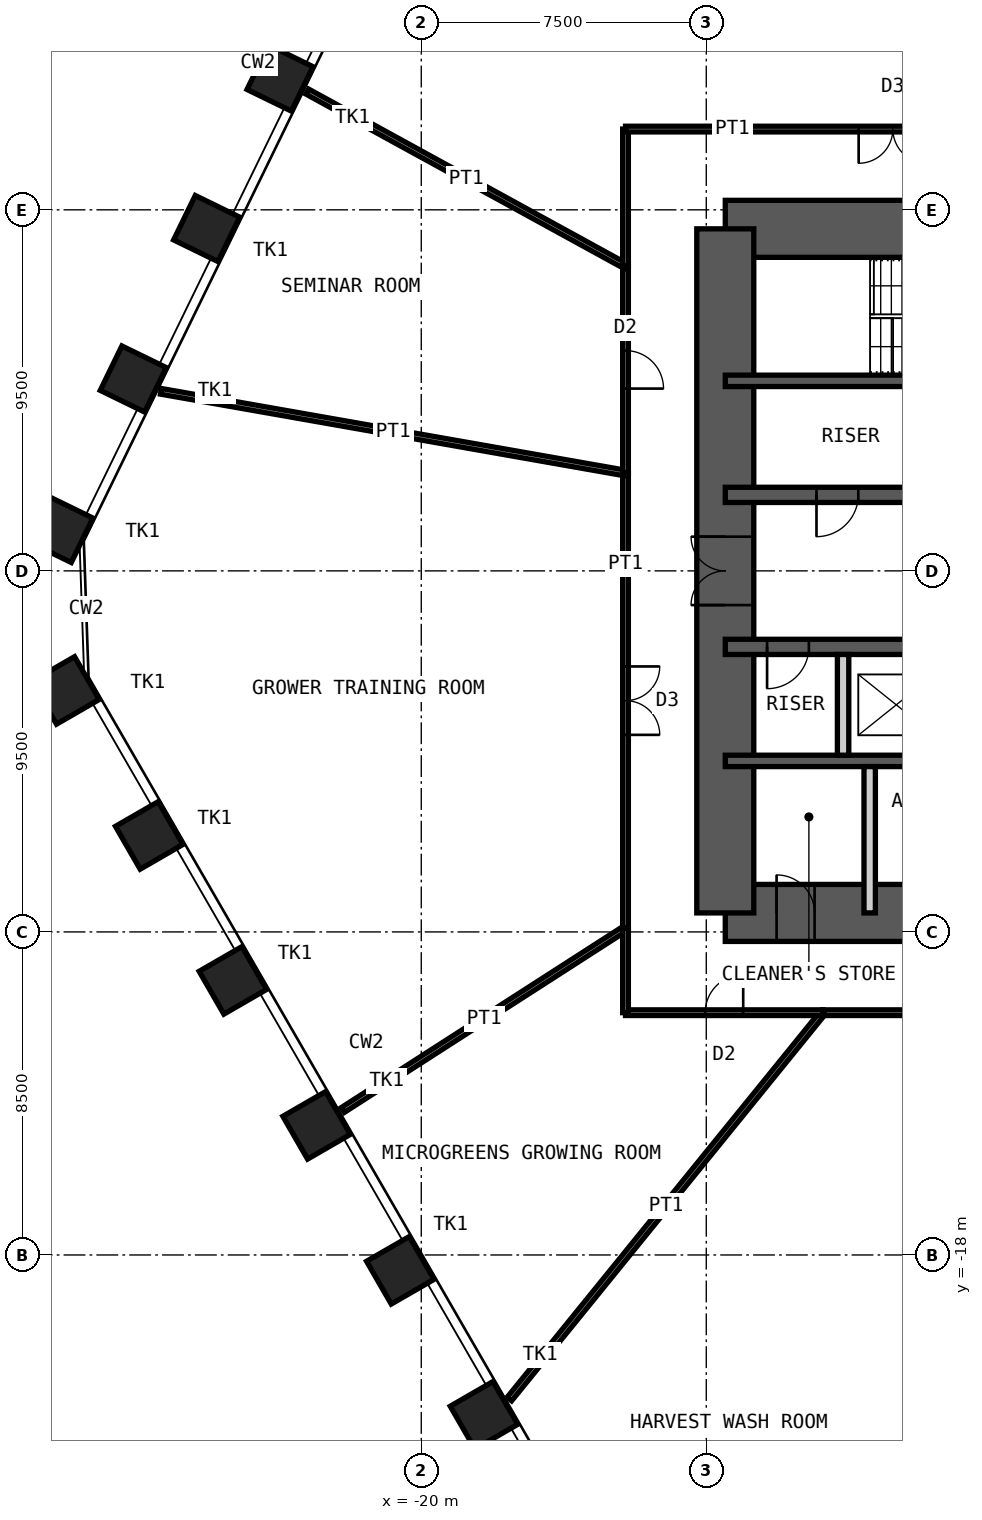
"""IFC4 building model, lengths in metres.
Left out: names, types, materials, properties, quantities, classifications, styles, units other than length and angle.
Written with IfcOpenShell. Run it as: python <this file> out.ifc"""

import sys

from ifc_helpers import new_model, si_unit, direction, frame, frame_2d, origin, origin_2d, place, context, subcontext, project, spatial, rectangle, hollow_rectangle, extrude, element, fill, save


model = new_model("IFC4")
c1 = context("Model", 3, precision=1e-05, world=origin(), true_north=direction((0.0, 1.0)))
c2 = subcontext(c1, "Body", "Model", "MODEL_VIEW")
j1 = project(units=[si_unit("LENGTHUNIT", "METRE"), si_unit("PLANEANGLEUNIT", "RADIAN")], contexts=[c1])
p1 = place(None, origin())
s1 = spatial("IfcSite", under=j1, at=p1, CompositionType="ELEMENT")
p2 = place(p1, origin())
s2 = spatial("IfcBuilding", under=s1, at=p2, CompositionType="ELEMENT")
p3 = place(p2, frame((0.0, 0.0, 92.0)))
s3 = spatial("IfcBuildingStorey", under=s2, at=p3, CompositionType="ELEMENT", Elevation=92.0)
for number, where, z_axis, x_axis in (
    (1, (-18.349, -22.218, 0.0), (0.0, 0.0, 1.0), (0.5, -0.866, 0.0)),
    (2, (-20.552, -18.404, 0.0), (0.0, 0.0, 1.0), (0.5, -0.866, 0.0)),
    (3, (-22.754, -14.589, 0.0), (0.0, 0.0, 1.0), (0.5, -0.866, 0.0)),
    (4, (-24.956, -10.775, 0.0), (0.0, 0.0, 1.0), (0.5, -0.866, 0.0)),
    (5, (-27.158, -6.96, 0.0), (0.0, 0.0, 1.0), (0.5, -0.866, 0.0)),
    (6, (-29.361, -3.146, 0.0), (0.0, 0.0, 1.0), (0.5, -0.866, 0.0)),
    (7, (-29.509, 1.09, 0.0), (0.0, 0.0, 1.0), (-0.438, -0.899, 0.0)),
    (8, (-27.578, 5.049, 0.0), (0.0, 0.0, 1.0), (-0.438, -0.899, 0.0)),
    (9, (-25.647, 9.008, 0.0), (0.0, 0.0, 1.0), (-0.438, -0.899, 0.0)),
    (10, (-23.716, 12.966, 0.0), (0.0, 0.0, 1.0), (-0.438, -0.899, 0.0)),
):
    element("IfcColumn", number, at=place(p3, frame(where, z_axis=z_axis, x_axis=x_axis)), inside=s3, PredefinedType="COLUMN", context=c2, shape_type="SweptSolid", body=[
        extrude(hollow_rectangle(XDim=1.3, YDim=1.3, WallThickness=0.1, at=origin_2d()), origin(), (0.0, 0.0, 1.0), 5.0),
    ])
p4 = place(p3, frame((-12.0, 9.0, 0.0), z_axis=(0.0, 0.0, 1.0), x_axis=(1.0, 0.0, 0.0)))
e11 = element("IfcWall", 11, at=p4, inside=s3, PredefinedType="SHEAR", context=c2, shape_type="SweptSolid", body=[
    extrude(rectangle(XDim=24.0, YDim=1.5, at=frame_2d((12.0, 0.0))), origin(), (0.0, 0.0, 1.0), 5.0),
])
p5 = place(p4, frame((10.4, 0.0, 0.0)))
e12 = element("IfcOpeningElement", 12, at=p5, cuts=e11, PredefinedType="OPENING", context=c2, shape_type="SweptSolid", body=[
    extrude(rectangle(XDim=1.0, YDim=2.1, at=frame_2d((0.5, 1.05))), frame((0.0, 0.76, 0.0), z_axis=(0.0, -1.0, 0.0), x_axis=(1.0, 0.0, 0.0)), (0.0, 0.0, 1.0), 1.52),
])
p6 = place(p4, frame((17.6, 0.0, 0.0)))
e13 = element("IfcOpeningElement", 13, at=p6, cuts=e11, PredefinedType="OPENING", context=c2, shape_type="SweptSolid", body=[
    extrude(rectangle(XDim=0.9, YDim=2.1, at=frame_2d((0.45, 1.05))), frame((0.0, 0.76, 0.0), z_axis=(0.0, -1.0, 0.0), x_axis=(1.0, 0.0, 0.0)), (0.0, 0.0, 1.0), 1.52),
])
p7 = place(p4, frame((21.9, 0.0, 0.0)))
e14 = element("IfcOpeningElement", 14, at=p7, cuts=e11, PredefinedType="OPENING", context=c2, shape_type="SweptSolid", body=[
    extrude(rectangle(XDim=0.9, YDim=2.1, at=frame_2d((0.45, 1.05))), frame((0.0, 0.76, 0.0), z_axis=(0.0, -1.0, 0.0), x_axis=(1.0, 0.0, 0.0)), (0.0, 0.0, 1.0), 1.52),
])
p8 = place(p3, frame((-12.0, -9.0, 0.0), z_axis=(0.0, 0.0, 1.0), x_axis=(1.0, 0.0, 0.0)))
e15 = element("IfcWall", 15, at=p8, inside=s3, PredefinedType="SHEAR", context=c2, shape_type="SweptSolid", body=[
    extrude(rectangle(XDim=24.0, YDim=1.5, at=frame_2d((12.0, 0.0))), origin(), (0.0, 0.0, 1.0), 5.0),
])
p9 = place(p8, frame((1.35, 0.0, 0.0)))
e16 = element("IfcOpeningElement", 16, at=p9, cuts=e15, PredefinedType="OPENING", context=c2, shape_type="SweptSolid", body=[
    extrude(rectangle(XDim=1.0, YDim=2.1, at=frame_2d((0.5, 1.05))), frame((0.0, 0.76, 0.0), z_axis=(0.0, -1.0, 0.0), x_axis=(1.0, 0.0, 0.0)), (0.0, 0.0, 1.0), 1.52),
])
p10 = place(p8, frame((5.325, 0.0, 0.0)))
e17 = element("IfcOpeningElement", 17, at=p10, cuts=e15, PredefinedType="OPENING", context=c2, shape_type="SweptSolid", body=[
    extrude(rectangle(XDim=1.15, YDim=2.1, at=frame_2d((0.575, 1.05))), frame((0.0, 0.76, 0.0), z_axis=(0.0, -1.0, 0.0), x_axis=(1.0, 0.0, 0.0)), (0.0, 0.0, 1.0), 1.52),
])
p11 = place(p8, frame((12.6, 0.0, 0.0)))
e18 = element("IfcOpeningElement", 18, at=p11, cuts=e15, PredefinedType="OPENING", context=c2, shape_type="SweptSolid", body=[
    extrude(rectangle(XDim=1.0, YDim=2.1, at=frame_2d((0.5, 1.05))), frame((0.0, 0.76, 0.0), z_axis=(0.0, -1.0, 0.0), x_axis=(1.0, 0.0, 0.0)), (0.0, 0.0, 1.0), 1.52),
])
p12 = place(p3, frame((-12.0, -9.0, 0.0), z_axis=(0.0, 0.0, 1.0), x_axis=(0.0, 1.0, 0.0)))
e19 = element("IfcWall", 19, at=p12, inside=s3, PredefinedType="SHEAR", context=c2, shape_type="SweptSolid", body=[
    extrude(rectangle(XDim=18.0, YDim=1.5, at=frame_2d((9.0, 0.0))), origin(), (0.0, 0.0, 1.0), 5.0),
])
p13 = place(p12, frame((8.1, 0.0, 0.0)))
e20 = element("IfcOpeningElement", 20, at=p13, cuts=e19, PredefinedType="OPENING", context=c2, shape_type="SweptSolid", body=[
    extrude(rectangle(XDim=1.8, YDim=2.1, at=frame_2d((0.9, 1.05))), frame((0.0, 0.76, 0.0), z_axis=(0.0, -1.0, 0.0), x_axis=(1.0, 0.0, 0.0)), (0.0, 0.0, 1.0), 1.52),
])
p14 = place(p3, frame((-12.0, 5.0, 0.0), z_axis=(0.0, 0.0, 1.0), x_axis=(1.0, 0.0, 0.0)))
e21 = element("IfcWall", 21, at=p14, inside=s3, PredefinedType="SHEAR", context=c2, shape_type="SweptSolid", body=[
    extrude(rectangle(XDim=24.0, YDim=0.3, at=frame_2d((12.0, 0.0))), origin(), (0.0, 0.0, 1.0), 5.0),
])
p15 = place(p3, frame((-12.0, 2.0, 0.0), z_axis=(0.0, 0.0, 1.0), x_axis=(1.0, 0.0, 0.0)))
e22 = element("IfcWall", 22, at=p15, inside=s3, PredefinedType="SHEAR", context=c2, shape_type="SweptSolid", body=[
    extrude(rectangle(XDim=24.0, YDim=0.4, at=frame_2d((12.0, 0.0))), origin(), (0.0, 0.0, 1.0), 5.0),
])
p16 = place(p15, frame((2.4, 0.0, 0.0)))
e23 = element("IfcOpeningElement", 23, at=p16, cuts=e22, PredefinedType="OPENING", context=c2, shape_type="SweptSolid", body=[
    extrude(rectangle(XDim=1.1, YDim=2.1, at=frame_2d((0.55, 1.05))), frame((0.0, 0.21, 0.0), z_axis=(0.0, -1.0, 0.0), x_axis=(1.0, 0.0, 0.0)), (0.0, 0.0, 1.0), 0.42),
])
p17 = place(p15, frame((22.0, 0.0, 0.0)))
e24 = element("IfcOpeningElement", 24, at=p17, cuts=e22, PredefinedType="OPENING", context=c2, shape_type="SweptSolid", body=[
    extrude(rectangle(XDim=1.1, YDim=2.1, at=frame_2d((0.55, 1.05))), frame((0.0, 0.21, 0.0), z_axis=(0.0, -1.0, 0.0), x_axis=(1.0, 0.0, 0.0)), (0.0, 0.0, 1.0), 0.42),
])
p18 = place(p15, frame((10.15, 0.0, 0.0)))
e25 = element("IfcOpeningElement", 25, at=p18, cuts=e22, PredefinedType="OPENING", context=c2, shape_type="SweptSolid", body=[
    extrude(rectangle(XDim=1.0, YDim=2.1, at=frame_2d((0.5, 1.05))), frame((0.0, 0.21, 0.0), z_axis=(0.0, -1.0, 0.0), x_axis=(1.0, 0.0, 0.0)), (0.0, 0.0, 1.0), 0.42),
])
p19 = place(p15, frame((6.7, 0.0, 0.0)))
e26 = element("IfcOpeningElement", 26, at=p19, cuts=e22, PredefinedType="OPENING", context=c2, shape_type="SweptSolid", body=[
    extrude(rectangle(XDim=1.4, YDim=2.4, at=frame_2d((0.7, 1.2))), frame((0.0, 0.21, 0.0), z_axis=(0.0, -1.0, 0.0), x_axis=(1.0, 0.0, 0.0)), (0.0, 0.0, 1.0), 0.42),
])
p20 = place(p15, frame((13.35, 0.0, 0.0)))
e27 = element("IfcOpeningElement", 27, at=p20, cuts=e22, PredefinedType="OPENING", context=c2, shape_type="SweptSolid", body=[
    extrude(rectangle(XDim=1.1, YDim=2.4, at=frame_2d((0.55, 1.2))), frame((0.0, 0.21, 0.0), z_axis=(0.0, -1.0, 0.0), x_axis=(1.0, 0.0, 0.0)), (0.0, 0.0, 1.0), 0.42),
])
p21 = place(p15, frame((16.15, 0.0, 0.0)))
e28 = element("IfcOpeningElement", 28, at=p21, cuts=e22, PredefinedType="OPENING", context=c2, shape_type="SweptSolid", body=[
    extrude(rectangle(XDim=1.1, YDim=2.4, at=frame_2d((0.55, 1.2))), frame((0.0, 0.21, 0.0), z_axis=(0.0, -1.0, 0.0), x_axis=(1.0, 0.0, 0.0)), (0.0, 0.0, 1.0), 0.42),
])
p22 = place(p15, frame((18.95, 0.0, 0.0)))
e29 = element("IfcOpeningElement", 29, at=p22, cuts=e22, PredefinedType="OPENING", context=c2, shape_type="SweptSolid", body=[
    extrude(rectangle(XDim=1.1, YDim=2.4, at=frame_2d((0.55, 1.2))), frame((0.0, 0.21, 0.0), z_axis=(0.0, -1.0, 0.0), x_axis=(1.0, 0.0, 0.0)), (0.0, 0.0, 1.0), 0.42),
])
p23 = place(p3, frame((-12.0, -2.0, 0.0), z_axis=(0.0, 0.0, 1.0), x_axis=(1.0, 0.0, 0.0)))
e30 = element("IfcWall", 30, at=p23, inside=s3, PredefinedType="SHEAR", context=c2, shape_type="SweptSolid", body=[
    extrude(rectangle(XDim=24.0, YDim=0.4, at=frame_2d((12.0, 0.0))), origin(), (0.0, 0.0, 1.0), 5.0),
])
p24 = place(p23, frame((1.1, 0.0, 0.0)))
e31 = element("IfcOpeningElement", 31, at=p24, cuts=e30, PredefinedType="OPENING", context=c2, shape_type="SweptSolid", body=[
    extrude(rectangle(XDim=1.1, YDim=2.1, at=frame_2d((0.55, 1.05))), frame((0.0, 0.21, 0.0), z_axis=(0.0, -1.0, 0.0), x_axis=(1.0, 0.0, 0.0)), (0.0, 0.0, 1.0), 0.42),
])
p25 = place(p23, frame((13.55, 0.0, 0.0)))
e32 = element("IfcOpeningElement", 32, at=p25, cuts=e30, PredefinedType="OPENING", context=c2, shape_type="SweptSolid", body=[
    extrude(rectangle(XDim=1.1, YDim=2.1, at=frame_2d((0.55, 1.05))), frame((0.0, 0.21, 0.0), z_axis=(0.0, -1.0, 0.0), x_axis=(1.0, 0.0, 0.0)), (0.0, 0.0, 1.0), 0.42),
])
p26 = place(p23, frame((20.7, 0.0, 0.0)))
e33 = element("IfcOpeningElement", 33, at=p26, cuts=e30, PredefinedType="OPENING", context=c2, shape_type="SweptSolid", body=[
    extrude(rectangle(XDim=1.1, YDim=2.1, at=frame_2d((0.55, 1.05))), frame((0.0, 0.21, 0.0), z_axis=(0.0, -1.0, 0.0), x_axis=(1.0, 0.0, 0.0)), (0.0, 0.0, 1.0), 0.42),
])
p27 = place(p3, frame((-12.0, -5.0, 0.0), z_axis=(0.0, 0.0, 1.0), x_axis=(1.0, 0.0, 0.0)))
e34 = element("IfcWall", 34, at=p27, inside=s3, PredefinedType="SHEAR", context=c2, shape_type="SweptSolid", body=[
    extrude(rectangle(XDim=24.0, YDim=0.3, at=frame_2d((12.0, 0.0))), origin(), (0.0, 0.0, 1.0), 5.0),
])
p28 = place(p3, frame((-8.9, -4.85, 0.0), z_axis=(0.0, 0.0, 1.0), x_axis=(0.0, 1.0, 0.0)))
e35 = element("IfcWall", 35, at=p28, inside=s3, PredefinedType="PARTITIONING", context=c2, shape_type="SweptSolid", body=[
    extrude(rectangle(XDim=2.65, YDim=0.3, at=frame_2d((1.325, 0.0))), origin(), (0.0, 0.0, 1.0), 4.78),
])
p29 = place(p3, frame((-8.2, -9.0, 0.0), z_axis=(0.0, 0.0, 1.0), x_axis=(0.0, 1.0, 0.0)))
e36 = element("IfcWall", 36, at=p29, inside=s3, PredefinedType="PARTITIONING", context=c2, shape_type="SweptSolid", body=[
    extrude(rectangle(XDim=3.85, YDim=0.3, at=frame_2d((1.925, 0.0))), origin(), (0.0, 0.0, 1.0), 4.78),
])
p30 = place(p3, frame((-22.063, -14.185, 0.0), z_axis=(0.0, 0.0, 1.0), x_axis=(0.841147976126, 0.540805031651, 0.0)))
e37 = element("IfcWall", 37, at=p30, inside=s3, PredefinedType="PARTITIONING", context=c2, shape_type="SweptSolid", body=[
    extrude(rectangle(XDim=8.843, YDim=0.15, at=frame_2d((4.422, 0.0))), origin(), (0.0, 0.0, 1.0), 3.82),
])
p31 = place(p3, frame((-14.625, -9.403, 0.0), z_axis=(0.0, 0.0, 1.0), x_axis=(0.0, 1.0, 0.0)))
e38 = element("IfcWall", 38, at=p31, inside=s3, PredefinedType="PARTITIONING", context=c2, shape_type="SweptSolid", body=[
    extrude(rectangle(XDim=11.976, YDim=0.15, at=frame_2d((5.988, 0.0))), origin(), (0.0, 0.0, 1.0), 4.72),
])
p32 = place(p31, frame((5.088, 0.0, 0.0)))
e39 = element("IfcOpeningElement", 39, at=p32, cuts=e38, PredefinedType="OPENING", context=c2, shape_type="SweptSolid", body=[
    extrude(rectangle(XDim=1.8, YDim=2.4, at=frame_2d((0.9, 1.2))), frame((0.0, 0.085, 0.0), z_axis=(0.0, -1.0, 0.0), x_axis=(1.0, 0.0, 0.0)), (0.0, 0.0, 1.0), 0.17),
])
p33 = place(p3, frame((-26.85, 4.725, 0.0), z_axis=(0.0, 0.0, 1.0), x_axis=(0.984869569104, -0.173297235559, 0.0)))
e40 = element("IfcWall", 40, at=p33, inside=s3, PredefinedType="PARTITIONING", context=c2, shape_type="SweptSolid", body=[
    extrude(rectangle(XDim=12.413, YDim=0.15, at=frame_2d((6.207, 0.0))), origin(), (0.0, 0.0, 1.0), 3.82),
])
p34 = place(p3, frame((-14.625, 2.573, 0.0), z_axis=(0.0, 0.0, 1.0), x_axis=(0.0, 1.0, 0.0)))
e41 = element("IfcWall", 41, at=p34, inside=s3, PredefinedType="PARTITIONING", context=c2, shape_type="SweptSolid", body=[
    extrude(rectangle(XDim=5.446, YDim=0.15, at=frame_2d((2.723, 0.0))), origin(), (0.0, 0.0, 1.0), 4.72),
])
p35 = place(p34, frame((2.223, 0.0, 0.0)))
e42 = element("IfcOpeningElement", 42, at=p35, cuts=e41, PredefinedType="OPENING", context=c2, shape_type="SweptSolid", body=[
    extrude(rectangle(XDim=1.0, YDim=2.4, at=frame_2d((0.5, 1.2))), frame((0.0, 0.085, 0.0), z_axis=(0.0, -1.0, 0.0), x_axis=(1.0, 0.0, 0.0)), (0.0, 0.0, 1.0), 0.17),
])
p36 = place(p3, frame((-22.999, 12.612, 0.0), z_axis=(0.0, 0.0, 1.0), x_axis=(0.876825619135, -0.480808520752, 0.0)))
e43 = element("IfcWall", 43, at=p36, inside=s3, PredefinedType="PARTITIONING", context=c2, shape_type="SweptSolid", body=[
    extrude(rectangle(XDim=9.551, YDim=0.15, at=frame_2d((4.775, 0.0))), origin(), (0.0, 0.0, 1.0), 3.52),
])
p37 = place(p3, frame((-14.625, 8.02, 0.0), z_axis=(0.0, 0.0, 1.0), x_axis=(0.0, 1.0, 0.0)))
e44 = element("IfcWall", 44, at=p37, inside=s3, PredefinedType="PARTITIONING", context=c2, shape_type="SweptSolid", body=[
    extrude(rectangle(XDim=3.605, YDim=0.15, at=frame_2d((1.803, 0.0))), origin(), (0.0, 0.0, 1.0), 4.72),
])
p38 = place(p3, frame((-14.625, 11.625, 0.0), z_axis=(0.0, 0.0, 1.0), x_axis=(1.0, 0.0, 0.0)))
e45 = element("IfcWall", 45, at=p38, inside=s3, PredefinedType="PARTITIONING", context=c2, shape_type="SweptSolid", body=[
    extrude(rectangle(XDim=14.069, YDim=0.15, at=frame_2d((7.035, 0.0))), origin(), (0.0, 0.0, 1.0), 4.72),
])
p39 = place(p38, frame((6.135, 0.0, 0.0)))
e46 = element("IfcOpeningElement", 46, at=p39, cuts=e45, PredefinedType="OPENING", context=c2, shape_type="SweptSolid", body=[
    extrude(rectangle(XDim=1.8, YDim=2.4, at=frame_2d((0.9, 1.2))), frame((0.0, 0.085, 0.0), z_axis=(0.0, -1.0, 0.0), x_axis=(1.0, 0.0, 0.0)), (0.0, 0.0, 1.0), 0.17),
])
p40 = place(p3, frame((-8.179, -26.843, 0.0), z_axis=(0.0, 0.0, 1.0), x_axis=(0.291466333136, 0.956581087336, 0.0)))
e47 = element("IfcWall", 47, at=p40, inside=s3, PredefinedType="PARTITIONING", context=c2, shape_type="SweptSolid", body=[
    extrude(rectangle(XDim=15.908, YDim=0.15, at=frame_2d((7.954, 0.0))), origin(), (0.0, 0.0, 1.0), 3.82),
])
p41 = place(p3, frame((-3.542, -11.625, 0.0), z_axis=(0.0, 0.0, 1.0), x_axis=(-1.0, 0.0, 0.0)))
e48 = element("IfcWall", 48, at=p41, inside=s3, PredefinedType="PARTITIONING", context=c2, shape_type="SweptSolid", body=[
    extrude(rectangle(XDim=5.89, YDim=0.15, at=frame_2d((2.945, 0.0))), origin(), (0.0, 0.0, 1.0), 4.72),
])
p42 = place(p41, frame((2.445, 0.0, 0.0)))
e49 = element("IfcOpeningElement", 49, at=p42, cuts=e48, PredefinedType="OPENING", context=c2, shape_type="SweptSolid", body=[
    extrude(rectangle(XDim=1.0, YDim=2.4, at=frame_2d((0.5, 1.2))), frame((0.0, 0.085, 0.0), z_axis=(0.0, -1.0, 0.0), x_axis=(1.0, 0.0, 0.0)), (0.0, 0.0, 1.0), 0.17),
])
p43 = place(p3, frame((-17.68, -21.791, 0.0), z_axis=(0.0, 0.0, 1.0), x_axis=(0.630054650118, 0.776550795418, 0.0)))
e50 = element("IfcWall", 50, at=p43, inside=s3, PredefinedType="PARTITIONING", context=c2, shape_type="SweptSolid", body=[
    extrude(rectangle(XDim=13.091, YDim=0.15, at=frame_2d((6.545, 0.0))), origin(), (0.0, 0.0, 1.0), 3.52),
])
p44 = place(p3, frame((-9.432, -11.625, 0.0), z_axis=(0.0, 0.0, 1.0), x_axis=(-1.0, 0.0, 0.0)))
e51 = element("IfcWall", 51, at=p44, inside=s3, PredefinedType="PARTITIONING", context=c2, shape_type="SweptSolid", body=[
    extrude(rectangle(XDim=5.193, YDim=0.15, at=frame_2d((2.596, 0.0))), origin(), (0.0, 0.0, 1.0), 4.72),
])
p45 = place(p44, frame((2.096, 0.0, 0.0)))
e52 = element("IfcOpeningElement", 52, at=p45, cuts=e51, PredefinedType="OPENING", context=c2, shape_type="SweptSolid", body=[
    extrude(rectangle(XDim=1.0, YDim=2.4, at=frame_2d((0.5, 1.2))), frame((0.0, 0.085, 0.0), z_axis=(0.0, -1.0, 0.0), x_axis=(1.0, 0.0, 0.0)), (0.0, 0.0, 1.0), 0.17),
])
p46 = place(p3, frame((-14.625, -11.625, 0.0), z_axis=(0.0, 0.0, 1.0), x_axis=(0.0, 1.0, 0.0)))
e53 = element("IfcWall", 53, at=p46, inside=s3, PredefinedType="PARTITIONING", context=c2, shape_type="SweptSolid", body=[
    extrude(rectangle(XDim=2.222, YDim=0.15, at=frame_2d((1.111, 0.0))), origin(), (0.0, 0.0, 1.0), 4.72),
])
p47 = place(p9, origin())
e54 = element("IfcDoor", 54, at=p47, inside=s3, OperationType="SINGLE_SWING_RIGHT", PredefinedType="DOOR", context=c2, shape_type="SweptSolid", body=[
    extrude(rectangle(XDim=1.0, YDim=2.1, at=frame_2d((0.5, 1.05))), frame((0.0, 0.025, 0.0), z_axis=(0.0, -1.0, 0.0), x_axis=(1.0, 0.0, 0.0)), (0.0, 0.0, 1.0), 0.05),
])
fill(e16, e54)
p48 = place(p16, origin())
e55 = element("IfcDoor", 55, at=p48, inside=s3, OperationType="SINGLE_SWING_LEFT", PredefinedType="DOOR", context=c2, shape_type="SweptSolid", body=[
    extrude(rectangle(XDim=1.1, YDim=2.1, at=frame_2d((0.55, 1.05))), frame((0.0, 0.025, 0.0), z_axis=(0.0, -1.0, 0.0), x_axis=(1.0, 0.0, 0.0)), (0.0, 0.0, 1.0), 0.05),
])
fill(e23, e55)
p49 = place(p24, origin())
e56 = element("IfcDoor", 56, at=p49, inside=s3, OperationType="SINGLE_SWING_LEFT", PredefinedType="DOOR", context=c2, shape_type="SweptSolid", body=[
    extrude(rectangle(XDim=1.1, YDim=2.1, at=frame_2d((0.55, 1.05))), frame((0.0, 0.025, 0.0), z_axis=(0.0, -1.0, 0.0), x_axis=(1.0, 0.0, 0.0)), (0.0, 0.0, 1.0), 0.05),
])
fill(e31, e56)
p50 = place(p13, origin())
e57 = element("IfcDoor", 57, at=p50, inside=s3, OperationType="DOUBLE_DOOR_DOUBLE_SWING", PredefinedType="DOOR", context=c2, shape_type="SweptSolid", body=[
    extrude(rectangle(XDim=1.8, YDim=2.1, at=frame_2d((0.9, 1.05))), frame((0.0, 0.025, 0.0), z_axis=(0.0, -1.0, 0.0), x_axis=(1.0, 0.0, 0.0)), (0.0, 0.0, 1.0), 0.05),
])
fill(e20, e57)
p51 = place(p32, origin())
e58 = element("IfcDoor", 58, at=p51, inside=s3, OperationType="DOUBLE_DOOR_DOUBLE_SWING", PredefinedType="DOOR", context=c2, shape_type="SweptSolid", body=[
    extrude(rectangle(XDim=1.8, YDim=2.4, at=frame_2d((0.9, 1.2))), frame((0.0, 0.025, 0.0), z_axis=(0.0, -1.0, 0.0), x_axis=(1.0, 0.0, 0.0)), (0.0, 0.0, 1.0), 0.05),
])
fill(e39, e58)
p52 = place(p35, origin())
e59 = element("IfcDoor", 59, at=p52, inside=s3, OperationType="SINGLE_SWING_LEFT", PredefinedType="DOOR", context=c2, shape_type="SweptSolid", body=[
    extrude(rectangle(XDim=1.0, YDim=2.4, at=frame_2d((0.5, 1.2))), frame((0.0, 0.025, 0.0), z_axis=(0.0, -1.0, 0.0), x_axis=(1.0, 0.0, 0.0)), (0.0, 0.0, 1.0), 0.05),
])
fill(e42, e59)
p53 = place(p39, origin())
e60 = element("IfcDoor", 60, at=p53, inside=s3, OperationType="DOUBLE_DOOR_DOUBLE_SWING", PredefinedType="DOOR", context=c2, shape_type="SweptSolid", body=[
    extrude(rectangle(XDim=1.8, YDim=2.4, at=frame_2d((0.9, 1.2))), frame((0.0, 0.025, 0.0), z_axis=(0.0, -1.0, 0.0), x_axis=(1.0, 0.0, 0.0)), (0.0, 0.0, 1.0), 0.05),
])
fill(e46, e60)
p54 = place(p45, origin())
e61 = element("IfcDoor", 61, at=p54, inside=s3, OperationType="SINGLE_SWING_LEFT", PredefinedType="DOOR", context=c2, shape_type="SweptSolid", body=[
    extrude(rectangle(XDim=1.0, YDim=2.4, at=frame_2d((0.5, 1.2))), frame((0.0, 0.025, 0.0), z_axis=(0.0, -1.0, 0.0), x_axis=(1.0, 0.0, 0.0)), (0.0, 0.0, 1.0), 0.05),
])
fill(e52, e61)
save(model, sys.argv[1])
